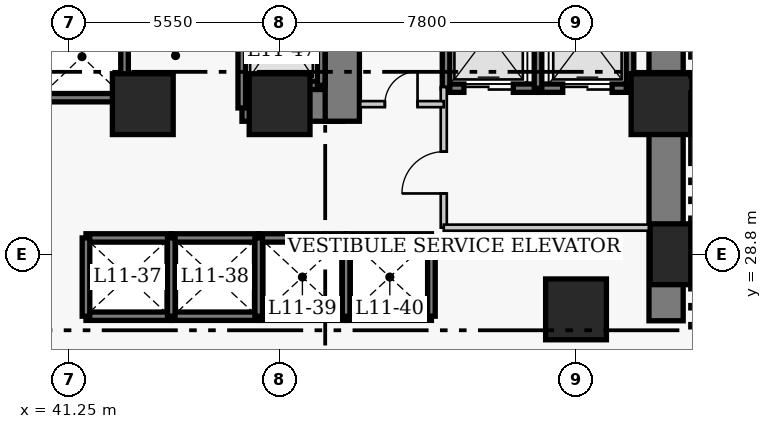
"""IFC4 building model, lengths in metres.
Left out: names, types, materials, properties, quantities, classifications, styles, units other than length and angle.
Written with IfcOpenShell. Run it as: python <this file> out.ifc"""

import sys

from ifc_helpers import new_model, si_unit, direction, frame, frame_2d, origin, origin_2d, place, context, subcontext, project, spatial, rectangle, extrude, element, fill, save


model = new_model("IFC4")
c1 = context("Model", 3, precision=1e-05, world=origin(), true_north=direction((0.0, 1.0)))
c2 = subcontext(c1, "Body", "Model", "MODEL_VIEW")
j1 = project(units=[si_unit("LENGTHUNIT", "METRE"), si_unit("PLANEANGLEUNIT", "RADIAN")], contexts=[c1])
p1 = place(None, origin())
s1 = spatial("IfcSite", under=j1, at=p1, CompositionType="ELEMENT")
p2 = place(p1, origin())
s2 = spatial("IfcBuilding", under=s1, at=p2, CompositionType="ELEMENT")
p3 = place(p2, frame((0.0, 0.0, 48.8)))
s3 = spatial("IfcBuildingStorey", under=s2, at=p3, CompositionType="ELEMENT", Elevation=48.8)
p4 = place(p3, frame((56.97, 27.05, 0.0), z_axis=(0.0, 0.0, 1.0), x_axis=(0.0, 1.0, 0.0)))
e1 = element("IfcWall", 1, at=p4, inside=s3, PredefinedType="SHEAR", context=c2, shape_type="SweptSolid", body=[
    extrude(rectangle(XDim=13.72, YDim=0.9, at=frame_2d((6.86, 0.0))), origin(), (0.0, 0.0, 1.0), 3.8),
])
p5 = place(p3, frame((45.81, 32.75, 0.0), z_axis=(0.0, 0.0, 1.0), x_axis=(1.0, 0.0, 0.0)))
e2 = element("IfcWall", 2, at=p5, inside=s3, PredefinedType="SHEAR", context=c2, shape_type="SweptSolid", body=[
    extrude(rectangle(XDim=2.64, YDim=0.9, at=frame_2d((1.32, 0.0))), origin(), (0.0, 0.0, 1.0), 3.8),
])
p6 = place(p3, frame((48.45, 32.3, 0.0), z_axis=(0.0, 0.0, 1.0), x_axis=(0.0, 1.0, 0.0)))
e3 = element("IfcWall", 3, at=p6, inside=s3, PredefinedType="SHEAR", context=c2, shape_type="SweptSolid", body=[
    extrude(rectangle(XDim=8.02, YDim=0.9, at=frame_2d((4.01, 0.0))), origin(), (0.0, 0.0, 1.0), 3.8),
])
p7 = place(p6, frame((5.9, 0.0, 0.0)))
e4 = element("IfcOpeningElement", 4, at=p7, cuts=e3, PredefinedType="OPENING", context=c2, shape_type="SweptSolid", body=[
    extrude(rectangle(XDim=1.1, YDim=2.15, at=frame_2d((0.55, 1.075))), frame((0.0, 0.46, 0.0), z_axis=(0.0, -1.0, 0.0), x_axis=(1.0, 0.0, 0.0)), (0.0, 0.0, 1.0), 0.92),
])
for number, where, z_axis, x_axis in (
    (5, (57.35, 28.8, 0.0), (0.0, 0.0, 1.0), (1.0, 0.0, 0.0)),
    (6, (43.2, 32.75, 0.0), (0.0, 0.0, 1.0), (1.0, 0.0, 0.0)),
    (7, (46.8, 32.75, 0.0), (0.0, 0.0, 1.0), (1.0, 0.0, 0.0)),
    (8, (54.6, 27.35, 0.0), (0.0, 0.0, 1.0), (1.0, 0.0, 0.0)),
    (9, (56.85, 32.75, 0.0), (0.0, 0.0, 1.0), (1.0, 0.0, 0.0)),
):
    element("IfcColumn", number, at=place(p3, frame(where, z_axis=z_axis, x_axis=x_axis)), inside=s3, PredefinedType="COLUMN", context=c2, shape_type="SweptSolid", body=[
        extrude(rectangle(XDim=1.6, YDim=1.6, at=origin_2d()), origin(), (0.0, 0.0, 1.0), 3.8),
    ])
for number, where, z_axis, x_axis in (
    (10, (41.705, 29.23, 0.0), (0.0, 0.0, 1.0), (1.0, 0.0, 0.0)),
    (11, (41.705, 27.17, 0.0), (0.0, 0.0, 1.0), (1.0, 0.0, 0.0)),
):
    element("IfcWall", number, at=place(p3, frame(where, z_axis=z_axis, x_axis=x_axis)), inside=s3, PredefinedType="SHEAR", context=c2, shape_type="SweptSolid", body=[
        extrude(rectangle(XDim=2.245, YDim=0.22, at=frame_2d((1.123, 0.0))), origin(), (0.0, 0.0, 1.0), 3.8),
    ])
p8 = place(p3, frame((41.705, 27.17, 0.0), z_axis=(0.0, 0.0, 1.0), x_axis=(0.0, 1.0, 0.0)))
e12 = element("IfcWall", 12, at=p8, inside=s3, PredefinedType="SHEAR", context=c2, shape_type="SweptSolid", body=[
    extrude(rectangle(XDim=2.06, YDim=0.2, at=frame_2d((1.03, 0.0))), origin(), (0.0, 0.0, 1.0), 3.8),
])
for number, where, z_axis, x_axis in (
    (13, (43.95, 29.23, 0.0), (0.0, 0.0, 1.0), (1.0, 0.0, 0.0)),
    (14, (43.95, 27.17, 0.0), (0.0, 0.0, 1.0), (1.0, 0.0, 0.0)),
):
    element("IfcWall", number, at=place(p3, frame(where, z_axis=z_axis, x_axis=x_axis)), inside=s3, PredefinedType="SHEAR", context=c2, shape_type="SweptSolid", body=[
        extrude(rectangle(XDim=2.3, YDim=0.22, at=frame_2d((1.15, 0.0))), origin(), (0.0, 0.0, 1.0), 3.8),
    ])
p9 = place(p3, frame((43.95, 27.17, 0.0), z_axis=(0.0, 0.0, 1.0), x_axis=(0.0, 1.0, 0.0)))
e15 = element("IfcWall", 15, at=p9, inside=s3, PredefinedType="SHEAR", context=c2, shape_type="SweptSolid", body=[
    extrude(rectangle(XDim=2.06, YDim=0.2, at=frame_2d((1.03, 0.0))), origin(), (0.0, 0.0, 1.0), 3.8),
])
for number, where, z_axis, x_axis in (
    (16, (46.25, 29.23, 0.0), (0.0, 0.0, 1.0), (1.0, 0.0, 0.0)),
    (17, (46.25, 27.17, 0.0), (0.0, 0.0, 1.0), (1.0, 0.0, 0.0)),
):
    element("IfcWall", number, at=place(p3, frame(where, z_axis=z_axis, x_axis=x_axis)), inside=s3, PredefinedType="SHEAR", context=c2, shape_type="SweptSolid", body=[
        extrude(rectangle(XDim=2.3, YDim=0.22, at=frame_2d((1.15, 0.0))), origin(), (0.0, 0.0, 1.0), 3.8),
    ])
p10 = place(p3, frame((46.25, 27.17, 0.0), z_axis=(0.0, 0.0, 1.0), x_axis=(0.0, 1.0, 0.0)))
e18 = element("IfcWall", 18, at=p10, inside=s3, PredefinedType="SHEAR", context=c2, shape_type="SweptSolid", body=[
    extrude(rectangle(XDim=2.06, YDim=0.2, at=frame_2d((1.03, 0.0))), origin(), (0.0, 0.0, 1.0), 3.8),
])
for number, where, z_axis, x_axis in (
    (19, (48.55, 29.23, 0.0), (0.0, 0.0, 1.0), (1.0, 0.0, 0.0)),
    (20, (48.55, 27.17, 0.0), (0.0, 0.0, 1.0), (1.0, 0.0, 0.0)),
):
    element("IfcWall", number, at=place(p3, frame(where, z_axis=z_axis, x_axis=x_axis)), inside=s3, PredefinedType="SHEAR", context=c2, shape_type="SweptSolid", body=[
        extrude(rectangle(XDim=2.245, YDim=0.22, at=frame_2d((1.123, 0.0))), origin(), (0.0, 0.0, 1.0), 3.8),
    ])
for number, where, z_axis, x_axis in (
    (21, (48.55, 27.17, 0.0), (0.0, 0.0, 1.0), (0.0, 1.0, 0.0)),
    (22, (50.795, 27.17, 0.0), (0.0, 0.0, 1.0), (0.0, 1.0, 0.0)),
):
    element("IfcWall", number, at=place(p3, frame(where, z_axis=z_axis, x_axis=x_axis)), inside=s3, PredefinedType="SHEAR", context=c2, shape_type="SweptSolid", body=[
        extrude(rectangle(XDim=2.06, YDim=0.2, at=frame_2d((1.03, 0.0))), origin(), (0.0, 0.0, 1.0), 3.8),
    ])
p11 = place(p3, frame((40.4, 32.92, 0.0), z_axis=(0.0, 0.0, 1.0), x_axis=(1.0, 0.0, 0.0)))
e23 = element("IfcWall", 23, at=p11, inside=s3, PredefinedType="SHEAR", context=c2, shape_type="SweptSolid", body=[
    extrude(rectangle(XDim=2.32, YDim=0.22, at=frame_2d((1.16, 0.0))), origin(), (0.0, 0.0, 1.0), 3.8),
])
p12 = place(p3, frame((42.72, 32.92, 0.0), z_axis=(0.0, 0.0, 1.0), x_axis=(0.0, 1.0, 0.0)))
e24 = element("IfcWall", 24, at=p12, inside=s3, PredefinedType="SHEAR", context=c2, shape_type="SweptSolid", body=[
    extrude(rectangle(XDim=2.16, YDim=0.2, at=frame_2d((1.08, 0.0))), origin(), (0.0, 0.0, 1.0), 3.8),
])
p13 = place(p3, frame((51.18, 33.17, 0.0), z_axis=(0.0, 0.0, 1.0), x_axis=(1.0, 0.0, 0.0)))
e25 = element("IfcWall", 25, at=p13, inside=s3, PredefinedType="SHEAR", context=c2, shape_type="SweptSolid", body=[
    extrude(rectangle(XDim=2.42, YDim=0.22, at=frame_2d((1.21, 0.0))), origin(), (0.0, 0.0, 1.0), 3.8),
])
p14 = place(p13, frame((0.47, 0.0, 0.0)))
e26 = element("IfcOpeningElement", 26, at=p14, cuts=e25, PredefinedType="OPENING", context=c2, shape_type="SweptSolid", body=[
    extrude(rectangle(XDim=1.3, YDim=2.15, at=frame_2d((0.65, 1.075))), frame((0.0, 0.12, 0.0), z_axis=(0.0, -1.0, 0.0), x_axis=(1.0, 0.0, 0.0)), (0.0, 0.0, 1.0), 0.24),
])
p15 = place(p3, frame((51.18, 33.17, 0.0), z_axis=(0.0, 0.0, 1.0), x_axis=(0.0, 1.0, 0.0)))
e27 = element("IfcWall", 27, at=p15, inside=s3, PredefinedType="SHEAR", context=c2, shape_type="SweptSolid", body=[
    extrude(rectangle(XDim=2.86, YDim=0.2, at=frame_2d((1.43, 0.0))), origin(), (0.0, 0.0, 1.0), 3.8),
])
p16 = place(p3, frame((53.6, 33.17, 0.0), z_axis=(0.0, 0.0, 1.0), x_axis=(1.0, 0.0, 0.0)))
e28 = element("IfcWall", 28, at=p16, inside=s3, PredefinedType="SHEAR", context=c2, shape_type="SweptSolid", body=[
    extrude(rectangle(XDim=2.42, YDim=0.22, at=frame_2d((1.21, 0.0))), origin(), (0.0, 0.0, 1.0), 3.8),
])
p17 = place(p16, frame((0.65, 0.0, 0.0)))
e29 = element("IfcOpeningElement", 29, at=p17, cuts=e28, PredefinedType="OPENING", context=c2, shape_type="SweptSolid", body=[
    extrude(rectangle(XDim=1.3, YDim=2.15, at=frame_2d((0.65, 1.075))), frame((0.0, 0.12, 0.0), z_axis=(0.0, -1.0, 0.0), x_axis=(1.0, 0.0, 0.0)), (0.0, 0.0, 1.0), 0.24),
])
for number, where, z_axis, x_axis in (
    (30, (53.6, 33.17, 0.0), (0.0, 0.0, 1.0), (0.0, 1.0, 0.0)),
    (31, (56.02, 33.17, 0.0), (0.0, 0.0, 1.0), (0.0, 1.0, 0.0)),
):
    element("IfcWall", number, at=place(p3, frame(where, z_axis=z_axis, x_axis=x_axis)), inside=s3, PredefinedType="SHEAR", context=c2, shape_type="SweptSolid", body=[
        extrude(rectangle(XDim=2.86, YDim=0.2, at=frame_2d((1.43, 0.0))), origin(), (0.0, 0.0, 1.0), 3.8),
    ])
p18 = place(p3, frame((45.805, 33.245, 0.0), z_axis=(0.0, 0.0, 1.0), x_axis=(1.0, 0.0, 0.0)))
e32 = element("IfcWall", 32, at=p18, inside=s3, PredefinedType="SHEAR", context=c2, shape_type="SweptSolid", body=[
    extrude(rectangle(XDim=2.09, YDim=0.22, at=frame_2d((1.045, 0.0))), origin(), (0.0, 0.0, 1.0), 3.8),
])
p19 = place(p3, frame((45.805, 32.65, 0.0), z_axis=(0.0, 0.0, 1.0), x_axis=(0.0, 1.0, 0.0)))
e33 = element("IfcWall", 33, at=p19, inside=s3, PredefinedType="SHEAR", context=c2, shape_type="SweptSolid", body=[
    extrude(rectangle(XDim=3.505, YDim=0.2, at=frame_2d((1.752, 0.0))), origin(), (0.0, 0.0, 1.0), 3.8),
])
p20 = place(p3, frame((47.895, 33.245, 0.0), z_axis=(0.0, 0.0, 1.0), x_axis=(0.0, 1.0, 0.0)))
e34 = element("IfcWall", 34, at=p20, inside=s3, PredefinedType="SHEAR", context=c2, shape_type="SweptSolid", body=[
    extrude(rectangle(XDim=2.91, YDim=0.2, at=frame_2d((1.455, 0.0))), origin(), (0.0, 0.0, 1.0), 3.8),
])
p21 = place(p3, frame((51.12, 29.5, 0.0), z_axis=(0.0, 0.0, 1.0), x_axis=(0.0, 1.0, 0.0)))
e35 = element("IfcWall", 35, at=p21, inside=s3, PredefinedType="PARTITIONING", context=c2, shape_type="SweptSolid", body=[
    extrude(rectangle(XDim=3.7, YDim=0.16, at=frame_2d((1.85, 0.0))), origin(), (0.0, 0.0, 1.0), 3.54),
])
p22 = place(p21, frame((0.9, 0.0, 0.0)))
e36 = element("IfcOpeningElement", 36, at=p22, cuts=e35, PredefinedType="OPENING", context=c2, shape_type="SweptSolid", body=[
    extrude(rectangle(XDim=1.1, YDim=2.15, at=frame_2d((0.55, 1.075))), frame((0.0, 0.09, 0.0), z_axis=(0.0, -1.0, 0.0), x_axis=(1.0, 0.0, 0.0)), (0.0, 0.0, 1.0), 0.18),
])
p23 = place(p3, frame((51.12, 29.5, 0.0), z_axis=(0.0, 0.0, 1.0), x_axis=(1.0, 0.0, 0.0)))
e37 = element("IfcWall", 37, at=p23, inside=s3, PredefinedType="PARTITIONING", context=c2, shape_type="SweptSolid", body=[
    extrude(rectangle(XDim=5.63, YDim=0.16, at=frame_2d((2.815, 0.0))), origin(), (0.0, 0.0, 1.0), 3.54),
])
p24 = place(p3, frame((48.92, 32.75, 0.0), z_axis=(0.0, 0.0, 1.0), x_axis=(1.0, 0.0, 0.0)))
e38 = element("IfcWall", 38, at=p24, inside=s3, PredefinedType="PARTITIONING", context=c2, shape_type="SweptSolid", body=[
    extrude(rectangle(XDim=2.2, YDim=0.16, at=frame_2d((1.1, 0.0))), origin(), (0.0, 0.0, 1.0), 3.54),
])
p25 = place(p24, frame((0.65, 0.0, 0.0)))
e39 = element("IfcOpeningElement", 39, at=p25, cuts=e38, PredefinedType="OPENING", context=c2, shape_type="SweptSolid", body=[
    extrude(rectangle(XDim=0.86, YDim=2.05, at=frame_2d((0.43, 1.025))), frame((0.0, 0.09, 0.0), z_axis=(0.0, -1.0, 0.0), x_axis=(1.0, 0.0, 0.0)), (0.0, 0.0, 1.0), 0.18),
])
p26 = place(p14, origin())
e40 = element("IfcDoor", 40, at=p26, inside=s3, OperationType="DOUBLE_DOOR_SLIDING", PredefinedType="DOOR", context=c2, shape_type="SweptSolid", body=[
    extrude(rectangle(XDim=1.3, YDim=2.15, at=frame_2d((0.65, 1.075))), frame((0.0, 0.025, 0.0), z_axis=(0.0, -1.0, 0.0), x_axis=(1.0, 0.0, 0.0)), (0.0, 0.0, 1.0), 0.05),
])
fill(e26, e40)
p27 = place(p17, origin())
e41 = element("IfcDoor", 41, at=p27, inside=s3, OperationType="DOUBLE_DOOR_SLIDING", PredefinedType="DOOR", context=c2, shape_type="SweptSolid", body=[
    extrude(rectangle(XDim=1.3, YDim=2.15, at=frame_2d((0.65, 1.075))), frame((0.0, 0.025, 0.0), z_axis=(0.0, -1.0, 0.0), x_axis=(1.0, 0.0, 0.0)), (0.0, 0.0, 1.0), 0.05),
])
fill(e29, e41)
p28 = place(p22, origin())
e42 = element("IfcDoor", 42, at=p28, inside=s3, OperationType="SINGLE_SWING_LEFT", PredefinedType="DOOR", context=c2, shape_type="SweptSolid", body=[
    extrude(rectangle(XDim=1.1, YDim=2.15, at=frame_2d((0.55, 1.075))), frame((0.0, 0.025, 0.0), z_axis=(0.0, -1.0, 0.0), x_axis=(1.0, 0.0, 0.0)), (0.0, 0.0, 1.0), 0.05),
])
fill(e36, e42)
p29 = place(p25, origin())
e43 = element("IfcDoor", 43, at=p29, inside=s3, OperationType="SINGLE_SWING_RIGHT", PredefinedType="DOOR", context=c2, shape_type="SweptSolid", body=[
    extrude(rectangle(XDim=0.86, YDim=2.05, at=frame_2d((0.43, 1.025))), frame((0.0, 0.025, 0.0), z_axis=(0.0, -1.0, 0.0), x_axis=(1.0, 0.0, 0.0)), (0.0, 0.0, 1.0), 0.05),
])
fill(e39, e43)
save(model, sys.argv[1])
